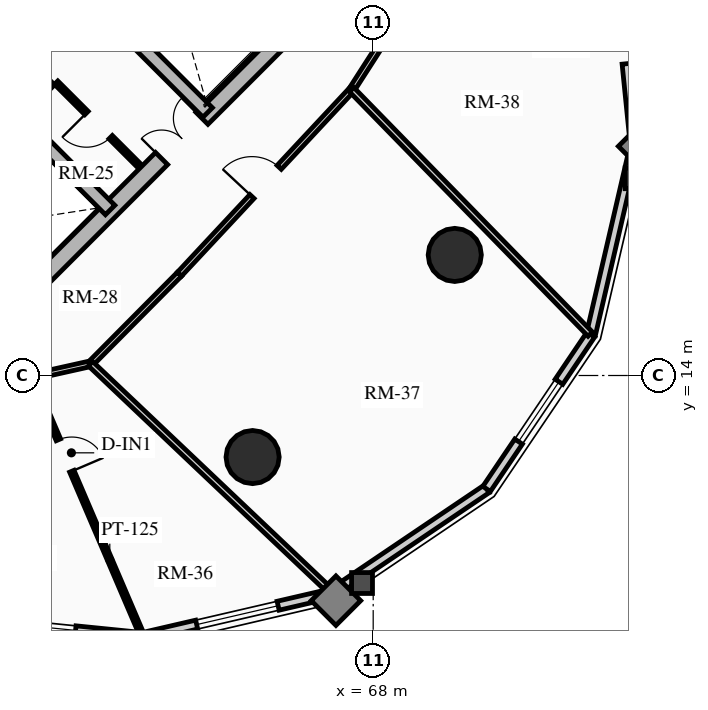
"""IFC4 building model, lengths in metres.
Left out: names, types, materials, properties, quantities, classifications, styles, units other than length and angle.
Written with IfcOpenShell. Run it as: python <this file> out.ifc"""

import sys

from ifc_helpers import new_model, si_unit, direction, frame, frame_2d, origin, origin_2d, place, context, subcontext, project, spatial, rectangle, circle, extrude, source, transform, mapped, element, fill, save


model = new_model("IFC4")
c1 = context("Model", 3, precision=1e-05, world=origin(), true_north=direction((0.0, 1.0)))
c2 = subcontext(c1, "Body", "Model", "MODEL_VIEW")
j1 = project(units=[si_unit("LENGTHUNIT", "METRE"), si_unit("PLANEANGLEUNIT", "RADIAN")], contexts=[c1])
p1 = place(None, origin())
s1 = spatial("IfcSite", under=j1, at=p1, CompositionType="ELEMENT")
p2 = place(p1, origin())
s2 = spatial("IfcBuilding", under=s1, at=p2, CompositionType="ELEMENT")
p3 = place(p2, frame((0.0, 0.0, 84.7)))
s3 = spatial("IfcBuildingStorey", under=s2, at=p3, CompositionType="ELEMENT", Elevation=84.7)
p4 = place(p3, frame((58.578, 15.856, 0.0), z_axis=(0.0, 0.0, 1.0), x_axis=(0.707106781187, 0.707106781187, 0.0)))
e1 = element("IfcWall", 1, at=p4, inside=s3, PredefinedType="SHEAR", context=c2, shape_type="SweptSolid", body=[
    extrude(rectangle(XDim=10.7, YDim=0.45, at=frame_2d((5.35, 0.0))), origin(), (0.0, 0.0, 1.0), 2.91),
])
m1 = source(origin(), c2, "Body", "SweptSolid", [
    extrude(rectangle(XDim=1.5, YDim=2.02, at=frame_2d((0.75, 1.01))), frame((0.0, 0.235, 0.0), z_axis=(0.0, -1.0, 0.0), x_axis=(1.0, 0.0, 0.0)), (0.0, 0.0, 1.0), 0.47),
])
p5 = place(p4, frame((5.45, 0.0, 0.0)))
e2 = element("IfcOpeningElement", 2, at=p5, cuts=e1, PredefinedType="OPENING", context=c2, shape_type="MappedRepresentation", body=[
    mapped(m1, transform((0.0, 0.0, 0.0), x_axis=(1.0, 0.0, 0.0), y_axis=(0.0, 1.0, 0.0), z_axis=(0.0, 0.0, 1.0), scale=1.0)),
])
p6 = place(p3, frame((61.078, 18.355, 0.0), z_axis=(0.0, 0.0, 1.0), x_axis=(-0.707106781187, 0.707106781187, 0.0)))
e3 = element("IfcWall", 3, at=p6, inside=s3, PredefinedType="SHEAR", context=c2, shape_type="SweptSolid", body=[
    extrude(rectangle(XDim=13.75, YDim=0.35, at=frame_2d((6.875, 0.0))), origin(), (0.0, 0.0, 1.0), 2.91),
])
m2 = source(origin(), c2, "Body", "SweptSolid", [
    extrude(rectangle(XDim=1.1, YDim=2.015, at=frame_2d((0.55, 1.007))), frame((0.0, 0.185, 0.0), z_axis=(0.0, -1.0, 0.0), x_axis=(1.0, 0.0, 0.0)), (0.0, 0.0, 1.0), 0.37),
])
p7 = place(p6, frame((4.875, 0.0, 0.0)))
e4 = element("IfcOpeningElement", 4, at=p7, cuts=e3, PredefinedType="OPENING", context=c2, shape_type="MappedRepresentation", body=[
    mapped(m2, transform((0.0, 0.0, 0.0), x_axis=(1.0, 0.0, 0.0), y_axis=(0.0, 1.0, 0.0), z_axis=(0.0, 0.0, 1.0), scale=1.0)),
])
m3 = source(origin(), c2, "Body", "SweptSolid", [
    extrude(rectangle(XDim=1.15, YDim=2.02, at=frame_2d((0.575, 1.01))), frame((0.0, 0.185, 0.0), z_axis=(0.0, -1.0, 0.0), x_axis=(1.0, 0.0, 0.0)), (0.0, 0.0, 1.0), 0.37),
])
p8 = place(p6, frame((7.295, 0.0, 0.0)))
e5 = element("IfcOpeningElement", 5, at=p8, cuts=e3, PredefinedType="OPENING", context=c2, shape_type="MappedRepresentation", body=[
    mapped(m3, transform((0.0, 0.0, 0.0), x_axis=(1.0, 0.0, 0.0), y_axis=(0.0, 1.0, 0.0), z_axis=(0.0, 0.0, 1.0), scale=1.0)),
])
p9 = place(p3, frame((63.645, 20.922, 0.0), z_axis=(0.0, 0.0, 1.0), x_axis=(-0.707106781187, 0.707106781187, 0.0)))
e6 = element("IfcWall", 6, at=p9, inside=s3, PredefinedType="SHEAR", context=c2, shape_type="SweptSolid", body=[
    extrude(rectangle(XDim=13.75, YDim=0.35, at=frame_2d((6.875, 0.0))), origin(), (0.0, 0.0, 1.0), 2.91),
])
p10 = place(p9, frame((10.0, 0.0, 0.0)))
e7 = element("IfcOpeningElement", 7, at=p10, cuts=e6, PredefinedType="OPENING", context=c2, shape_type="MappedRepresentation", body=[
    mapped(m2, transform((0.0, 0.0, 0.0), x_axis=(1.0, 0.0, 0.0), y_axis=(0.0, 1.0, 0.0), z_axis=(0.0, 0.0, 1.0), scale=1.0)),
])
p11 = place(p9, frame((12.0, 0.0, 0.0)))
e8 = element("IfcOpeningElement", 8, at=p11, cuts=e6, PredefinedType="OPENING", context=c2, shape_type="MappedRepresentation", body=[
    mapped(m2, transform((0.0, 0.0, 0.0), x_axis=(1.0, 0.0, 0.0), y_axis=(0.0, 1.0, 0.0), z_axis=(0.0, 0.0, 1.0), scale=1.0)),
])
p12 = place(p9, frame((5.305, 0.0, 0.0)))
e9 = element("IfcOpeningElement", 9, at=p12, cuts=e6, PredefinedType="OPENING", context=c2, shape_type="MappedRepresentation", body=[
    mapped(m3, transform((0.0, 0.0, 0.0), x_axis=(1.0, 0.0, 0.0), y_axis=(0.0, 1.0, 0.0), z_axis=(0.0, 0.0, 1.0), scale=1.0)),
])
for number, where, z_axis, x_axis in (
    (10, (64.827, 11.854, 0.0), (0.0, 0.0, 1.0), (1.0, 0.0, 0.0)),
    (11, (70.146, 17.173, 0.0), (0.0, 0.0, 1.0), (1.0, 0.0, 0.0)),
):
    element("IfcColumn", number, at=place(p3, frame(where, z_axis=z_axis, x_axis=x_axis)), inside=s3, PredefinedType="USERDEFINED", context=c2, shape_type="SweptSolid", body=[
        extrude(circle(Radius=0.7, at=origin_2d()), origin(), (0.0, 0.0, 1.0), 2.91),
    ])
p13 = place(p3, frame((61.933, 7.115, 0.0), z_axis=(0.0, 0.0, 1.0), x_axis=(-0.994971754311, 0.10015591906, 0.0)))
e12 = element("IfcWall", 12, at=p13, inside=s3, PredefinedType="SOLIDWALL", context=c2, shape_type="SweptSolid", body=[
    extrude(rectangle(XDim=5.448, YDim=0.24, at=frame_2d((2.724, 0.0))), origin(), (0.0, 0.0, 1.0), 2.179),
])
m4 = source(origin(), c2, "Body", "SweptSolid", [
    extrude(rectangle(XDim=1.9, YDim=1.35, at=frame_2d((0.95, 0.675))), frame((0.0, 0.13, 0.0), z_axis=(0.0, -1.0, 0.0), x_axis=(1.0, 0.0, 0.0)), (0.0, 0.0, 1.0), 0.26),
])
p14 = place(p13, frame((1.774, 0.0, 0.65)))
e13 = element("IfcOpeningElement", 13, at=p14, cuts=e12, PredefinedType="OPENING", context=c2, shape_type="MappedRepresentation", body=[
    mapped(m4, transform((0.0, 0.0, 0.0), x_axis=(1.0, 0.0, 0.0), y_axis=(0.0, 1.0, 0.0), z_axis=(0.0, 0.0, 1.0), scale=1.0)),
])
p15 = place(p3, frame((66.92, 8.271, 0.0), z_axis=(0.0, 0.0, 1.0), x_axis=(-0.974165631126, -0.225834725257, 0.0)))
e14 = element("IfcWall", 14, at=p15, inside=s3, PredefinedType="SOLIDWALL", context=c2, shape_type="SweptSolid", body=[
    extrude(rectangle(XDim=5.119, YDim=0.24, at=frame_2d((2.56, 0.0))), origin(), (0.0, 0.0, 1.0), 2.179),
])
m5 = source(origin(), c2, "Body", "SweptSolid", [
    extrude(rectangle(XDim=2.2, YDim=1.35, at=frame_2d((1.1, 0.675))), frame((0.0, 0.13, 0.0), z_axis=(0.0, -1.0, 0.0), x_axis=(1.0, 0.0, 0.0)), (0.0, 0.0, 1.0), 0.26),
])
p16 = place(p15, frame((1.459, 0.0, 0.65)))
e15 = element("IfcOpeningElement", 15, at=p16, cuts=e14, PredefinedType="OPENING", context=c2, shape_type="MappedRepresentation", body=[
    mapped(m5, transform((0.0, 0.0, 0.0), x_axis=(1.0, 0.0, 0.0), y_axis=(0.0, 1.0, 0.0), z_axis=(0.0, 0.0, 1.0), scale=1.0)),
])
p17 = place(p3, frame((70.985, 11.015, 0.0), z_axis=(0.0, 0.0, 1.0), x_axis=(-0.828781148131, -0.559572880421, 0.0)))
e16 = element("IfcWall", 16, at=p17, inside=s3, PredefinedType="SOLIDWALL", context=c2, shape_type="SweptSolid", body=[
    extrude(rectangle(XDim=4.905, YDim=0.24, at=frame_2d((2.452, 0.0))), origin(), (0.0, 0.0, 1.0), 2.179),
])
p18 = place(p3, frame((73.729, 15.08, 0.0), z_axis=(0.0, 0.0, 1.0), x_axis=(-0.559572880421, -0.828781148131, 0.0)))
e17 = element("IfcWall", 17, at=p18, inside=s3, PredefinedType="SOLIDWALL", context=c2, shape_type="SweptSolid", body=[
    extrude(rectangle(XDim=4.905, YDim=0.24, at=frame_2d((2.452, 0.0))), origin(), (0.0, 0.0, 1.0), 2.179),
])
p19 = place(p18, frame((1.502, 0.0, 0.65)))
e18 = element("IfcOpeningElement", 18, at=p19, cuts=e17, PredefinedType="OPENING", context=c2, shape_type="MappedRepresentation", body=[
    mapped(m4, transform((0.0, 0.0, 0.0), x_axis=(1.0, 0.0, 0.0), y_axis=(0.0, 1.0, 0.0), z_axis=(0.0, 0.0, 1.0), scale=1.0)),
])
p20 = place(p3, frame((74.885, 20.067, 0.0), z_axis=(0.0, 0.0, 1.0), x_axis=(-0.225834725257, -0.974165631126, 0.0)))
e19 = element("IfcWall", 19, at=p20, inside=s3, PredefinedType="SOLIDWALL", context=c2, shape_type="SweptSolid", body=[
    extrude(rectangle(XDim=5.119, YDim=0.24, at=frame_2d((2.56, 0.0))), origin(), (0.0, 0.0, 1.0), 2.179),
])
p21 = place(p3, frame((74.339, 25.487, 0.0), z_axis=(0.0, 0.0, 1.0), x_axis=(0.10015591906, -0.994971754311, 0.0)))
e20 = element("IfcWall", 20, at=p21, inside=s3, PredefinedType="SOLIDWALL", context=c2, shape_type="SweptSolid", body=[
    extrude(rectangle(XDim=5.448, YDim=0.24, at=frame_2d((2.724, 0.0))), origin(), (0.0, 0.0, 1.0), 2.179),
])
m6 = source(origin(), c2, "Body", "SweptSolid", [
    extrude(rectangle(XDim=1.15, YDim=2.005, at=frame_2d((0.575, 1.002))), frame((0.0, 0.13, 0.0), z_axis=(0.0, -1.0, 0.0), x_axis=(1.0, 0.0, 0.0)), (0.0, 0.0, 1.0), 0.26),
])
p22 = place(p21, frame((2.149, 0.0, 0.0)))
e21 = element("IfcOpeningElement", 21, at=p22, cuts=e20, PredefinedType="OPENING", context=c2, shape_type="MappedRepresentation", body=[
    mapped(m6, transform((0.0, 0.0, 0.0), x_axis=(1.0, 0.0, 0.0), y_axis=(0.0, 1.0, 0.0), z_axis=(0.0, 0.0, 1.0), scale=1.0)),
])
p23 = place(p3, frame((58.214, 21.467, 0.0), z_axis=(0.0, 0.0, 1.0), x_axis=(0.707106781187, 0.707106781187, 0.0)))
e22 = element("IfcWall", 22, at=p23, inside=s3, PredefinedType="PARTITIONING", context=c2, shape_type="SweptSolid", body=[
    extrude(rectangle(XDim=3.28, YDim=0.2, at=frame_2d((1.64, 0.0))), origin(), (0.0, 0.0, 1.0), 2.655),
])
m7 = source(origin(), c2, "Body", "SweptSolid", [
    extrude(rectangle(XDim=1.5, YDim=2.02, at=frame_2d((0.75, 1.01))), frame((0.0, 0.11, 0.0), z_axis=(0.0, -1.0, 0.0), x_axis=(1.0, 0.0, 0.0)), (0.0, 0.0, 1.0), 0.22),
])
p24 = place(p23, frame((1.55, 0.0, 0.0)))
e23 = element("IfcOpeningElement", 23, at=p24, cuts=e22, PredefinedType="OPENING", context=c2, shape_type="MappedRepresentation", body=[
    mapped(m7, transform((0.0, 0.0, 0.0), x_axis=(1.0, 0.0, 0.0), y_axis=(0.0, 1.0, 0.0), z_axis=(0.0, 0.0, 1.0), scale=1.0)),
])
p25 = place(p3, frame((61.835, 19.529, 0.0), z_axis=(0.0, 0.0, 1.0), x_axis=(-0.707146413884, 0.707067146267, 0.0)))
e24 = element("IfcWall", 24, at=p25, inside=s3, PredefinedType="PARTITIONING", context=c2, shape_type="SweptSolid", body=[
    extrude(rectangle(XDim=3.08, YDim=0.125, at=frame_2d((1.54, 0.0))), origin(), (0.0, 0.0, 1.0), 2.655),
])
m8 = source(origin(), c2, "Body", "SweptSolid", [
    extrude(rectangle(XDim=0.9, YDim=2.005, at=frame_2d((0.45, 1.002))), frame((0.0, 0.073, 0.0), z_axis=(0.0, -1.0, 0.0), x_axis=(1.0, 0.0, 0.0)), (0.0, 0.0, 1.0), 0.145),
])
p26 = place(p25, frame((1.05, 0.0, 0.0)))
e25 = element("IfcOpeningElement", 25, at=p26, cuts=e24, PredefinedType="OPENING", context=c2, shape_type="MappedRepresentation", body=[
    mapped(m8, transform((0.0, 0.0, 0.0), x_axis=(1.0, 0.0, 0.0), y_axis=(0.0, 1.0, 0.0), z_axis=(0.0, 0.0, 1.0), scale=1.0)),
])
p27 = place(p3, frame((58.794, 20.915, 0.0), z_axis=(0.0, 0.0, 1.0), x_axis=(0.707106781187, 0.707106781187, 0.0)))
e26 = element("IfcWall", 26, at=p27, inside=s3, PredefinedType="PARTITIONING", context=c2, shape_type="SweptSolid", body=[
    extrude(rectangle(XDim=1.1, YDim=0.125, at=frame_2d((0.55, 0.0))), origin(), (0.0, 0.0, 1.0), 2.655),
])
p28 = place(p3, frame((59.008, 13.963, 0.0), z_axis=(0.0, 0.0, 1.0), x_axis=(0.976020856791, 0.21767702476, 0.0)))
e27 = element("IfcWall", 27, at=p28, inside=s3, PredefinedType="PARTITIONING", context=c2, shape_type="SweptSolid", body=[
    extrude(rectangle(XDim=1.593, YDim=0.15, at=frame_2d((0.796, 0.0))), origin(), (0.0, 0.0, 1.0), 2.225),
])
p29 = place(p3, frame((60.562, 14.31, 0.0), z_axis=(0.0, 0.0, 1.0), x_axis=(0.704566236161, 0.709638230975, 0.0)))
e28 = element("IfcWall", 28, at=p29, inside=s3, PredefinedType="PARTITIONING", context=c2, shape_type="SweptSolid", body=[
    extrude(rectangle(XDim=3.321, YDim=0.15, at=frame_2d((1.661, 0.0))), origin(), (0.0, 0.0, 1.0), 2.225),
])
p30 = place(p3, frame((62.903, 16.667, 0.0), z_axis=(0.0, 0.0, 1.0), x_axis=(0.682371947497, 0.731005147225, 0.0)))
e29 = element("IfcWall", 29, at=p30, inside=s3, PredefinedType="PARTITIONING", context=c2, shape_type="SweptSolid", body=[
    extrude(rectangle(XDim=6.642, YDim=0.15, at=frame_2d((3.321, 0.0))), origin(), (0.0, 0.0, 1.0), 2.225),
])
m9 = source(origin(), c2, "Body", "SweptSolid", [
    extrude(rectangle(XDim=1.05, YDim=2.015, at=frame_2d((0.525, 1.007))), frame((0.0, 0.085, 0.0), z_axis=(0.0, -1.0, 0.0), x_axis=(1.0, 0.0, 0.0)), (0.0, 0.0, 1.0), 0.17),
])
p31 = place(p30, frame((2.796, 0.0, 0.0)))
e30 = element("IfcOpeningElement", 30, at=p31, cuts=e29, PredefinedType="OPENING", context=c2, shape_type="MappedRepresentation", body=[
    mapped(m9, transform((0.0, 0.0, 0.0), x_axis=(1.0, 0.0, 0.0), y_axis=(0.0, 1.0, 0.0), z_axis=(0.0, 0.0, 1.0), scale=1.0)),
])
p32 = place(p3, frame((67.435, 21.521, 0.0), z_axis=(0.0, 0.0, 1.0), x_axis=(0.540777197838, 0.841165870859, 0.0)))
e31 = element("IfcWall", 31, at=p32, inside=s3, PredefinedType="PARTITIONING", context=c2, shape_type="SweptSolid", body=[
    extrude(rectangle(XDim=1.888, YDim=0.15, at=frame_2d((0.944, 0.0))), origin(), (0.0, 0.0, 1.0), 2.225),
])
p33 = place(p3, frame((60.562, 14.31, 0.0), z_axis=(0.0, 0.0, 1.0), x_axis=(0.725582293335, -0.688135404989, 0.0)))
e32 = element("IfcWall", 32, at=p33, inside=s3, PredefinedType="PARTITIONING", context=c2, shape_type="SweptSolid", body=[
    extrude(rectangle(XDim=8.749, YDim=0.16, at=frame_2d((4.375, 0.0))), origin(), (0.0, 0.0, 1.0), 2.179),
])
p34 = place(p3, frame((67.435, 21.521, 0.0), z_axis=(0.0, 0.0, 1.0), x_axis=(0.6983880073, -0.715719352302, 0.0)))
e33 = element("IfcWall", 33, at=p34, inside=s3, PredefinedType="PARTITIONING", context=c2, shape_type="SweptSolid", body=[
    extrude(rectangle(XDim=8.987, YDim=0.16, at=frame_2d((4.494, 0.0))), origin(), (0.0, 0.0, 1.0), 2.179),
])
p35 = place(p3, frame((59.008, 13.963, 0.0), z_axis=(0.0, 0.0, 1.0), x_axis=(0.393439207333, -0.919350635032, 0.0)))
e34 = element("IfcWall", 34, at=p35, inside=s3, PredefinedType="PARTITIONING", context=c2, shape_type="SweptSolid", body=[
    extrude(rectangle(XDim=7.427, YDim=0.125, at=frame_2d((3.713, 0.0))), origin(), (0.0, 0.0, 1.0), 2.179),
])
p36 = place(p35, frame((1.8, 0.0, 0.0)))
e35 = element("IfcOpeningElement", 35, at=p36, cuts=e34, PredefinedType="OPENING", context=c2, shape_type="MappedRepresentation", body=[
    mapped(m8, transform((0.0, 0.0, 0.0), x_axis=(1.0, 0.0, 0.0), y_axis=(0.0, 1.0, 0.0), z_axis=(0.0, 0.0, 1.0), scale=1.0)),
])
m10 = source(origin(), c2, "Body", "SweptSolid", [
    extrude(rectangle(XDim=1.9, YDim=1.35, at=frame_2d((0.95, 0.675))), frame((0.0, 0.03, 0.0), z_axis=(0.0, -1.0, 0.0), x_axis=(1.0, 0.0, 0.0)), (0.0, 0.0, 1.0), 0.06),
])
p37 = place(p14, origin())
e36 = element("IfcWindow", 36, at=p37, inside=s3, PartitioningType="DOUBLE_PANEL_VERTICAL", PredefinedType="WINDOW", context=c2, shape_type="MappedRepresentation", body=[
    mapped(m10, transform((0.0, 0.0, 0.0), x_axis=(1.0, 0.0, 0.0), y_axis=(0.0, 1.0, 0.0), z_axis=(0.0, 0.0, 1.0), scale=1.0)),
])
fill(e13, e36)
m11 = source(origin(), c2, "Body", "SweptSolid", [
    extrude(rectangle(XDim=2.2, YDim=1.35, at=frame_2d((1.1, 0.675))), frame((0.0, 0.03, 0.0), z_axis=(0.0, -1.0, 0.0), x_axis=(1.0, 0.0, 0.0)), (0.0, 0.0, 1.0), 0.06),
])
p38 = place(p16, origin())
e37 = element("IfcWindow", 37, at=p38, inside=s3, PartitioningType="DOUBLE_PANEL_VERTICAL", PredefinedType="WINDOW", context=c2, shape_type="MappedRepresentation", body=[
    mapped(m11, transform((0.0, 0.0, 0.0), x_axis=(1.0, 0.0, 0.0), y_axis=(0.0, 1.0, 0.0), z_axis=(0.0, 0.0, 1.0), scale=1.0)),
])
fill(e15, e37)
p39 = place(p19, origin())
e38 = element("IfcWindow", 38, at=p39, inside=s3, PartitioningType="DOUBLE_PANEL_VERTICAL", PredefinedType="WINDOW", context=c2, shape_type="MappedRepresentation", body=[
    mapped(m10, transform((0.0, 0.0, 0.0), x_axis=(1.0, 0.0, 0.0), y_axis=(0.0, 1.0, 0.0), z_axis=(0.0, 0.0, 1.0), scale=1.0)),
])
fill(e18, e38)
m12 = source(origin(), c2, "Body", "SweptSolid", [
    extrude(rectangle(XDim=1.15, YDim=2.005, at=frame_2d((0.575, 1.002))), frame((0.0, 0.025, 0.0), z_axis=(0.0, -1.0, 0.0), x_axis=(1.0, 0.0, 0.0)), (0.0, 0.0, 1.0), 0.05),
])
p40 = place(p22, origin())
e39 = element("IfcDoor", 39, at=p40, inside=s3, OperationType="SINGLE_SWING_LEFT", PredefinedType="DOOR", context=c2, shape_type="MappedRepresentation", body=[
    mapped(m12, transform((0.0, 0.0, 0.0), x_axis=(1.0, 0.0, 0.0), y_axis=(0.0, 1.0, 0.0), z_axis=(0.0, 0.0, 1.0), scale=1.0)),
])
fill(e21, e39)
m13 = source(origin(), c2, "Body", "SweptSolid", [
    extrude(rectangle(XDim=1.5, YDim=2.02, at=frame_2d((0.75, 1.01))), frame((0.0, 0.025, 0.0), z_axis=(0.0, -1.0, 0.0), x_axis=(1.0, 0.0, 0.0)), (0.0, 0.0, 1.0), 0.05),
])
p41 = place(p5, origin())
e40 = element("IfcDoor", 40, at=p41, inside=s3, OperationType="DOUBLE_DOOR_SINGLE_SWING", PredefinedType="DOOR", context=c2, shape_type="MappedRepresentation", body=[
    mapped(m13, transform((0.0, 0.0, 0.0), x_axis=(1.0, 0.0, 0.0), y_axis=(0.0, 1.0, 0.0), z_axis=(0.0, 0.0, 1.0), scale=1.0)),
])
fill(e2, e40)
m14 = source(origin(), c2, "Body", "SweptSolid", [
    extrude(rectangle(XDim=0.9, YDim=2.005, at=frame_2d((0.45, 1.002))), frame((0.0, 0.025, 0.0), z_axis=(0.0, -1.0, 0.0), x_axis=(1.0, 0.0, 0.0)), (0.0, 0.0, 1.0), 0.05),
])
p42 = place(p26, origin())
e41 = element("IfcDoor", 41, at=p42, inside=s3, OperationType="SINGLE_SWING_RIGHT", PredefinedType="DOOR", context=c2, shape_type="MappedRepresentation", body=[
    mapped(m14, transform((0.0, 0.0, 0.0), x_axis=(1.0, 0.0, 0.0), y_axis=(0.0, 1.0, 0.0), z_axis=(0.0, 0.0, 1.0), scale=1.0)),
])
fill(e25, e41)
p43 = place(p36, origin())
e42 = element("IfcDoor", 42, at=p43, inside=s3, OperationType="SINGLE_SWING_RIGHT", PredefinedType="DOOR", context=c2, shape_type="MappedRepresentation", body=[
    mapped(m14, transform((0.0, 0.0, 0.0), x_axis=(1.0, 0.0, 0.0), y_axis=(0.0, 1.0, 0.0), z_axis=(0.0, 0.0, 1.0), scale=1.0)),
])
fill(e35, e42)
m15 = source(origin(), c2, "Body", "SweptSolid", [
    extrude(rectangle(XDim=1.05, YDim=2.015, at=frame_2d((0.525, 1.007))), frame((0.0, 0.025, 0.0), z_axis=(0.0, -1.0, 0.0), x_axis=(1.0, 0.0, 0.0)), (0.0, 0.0, 1.0), 0.05),
])
p44 = place(p31, origin())
e43 = element("IfcDoor", 43, at=p44, inside=s3, OperationType="SINGLE_SWING_LEFT", PredefinedType="DOOR", context=c2, shape_type="MappedRepresentation", body=[
    mapped(m15, transform((0.0, 0.0, 0.0), x_axis=(1.0, 0.0, 0.0), y_axis=(0.0, 1.0, 0.0), z_axis=(0.0, 0.0, 1.0), scale=1.0)),
])
fill(e30, e43)
save(model, sys.argv[1])
